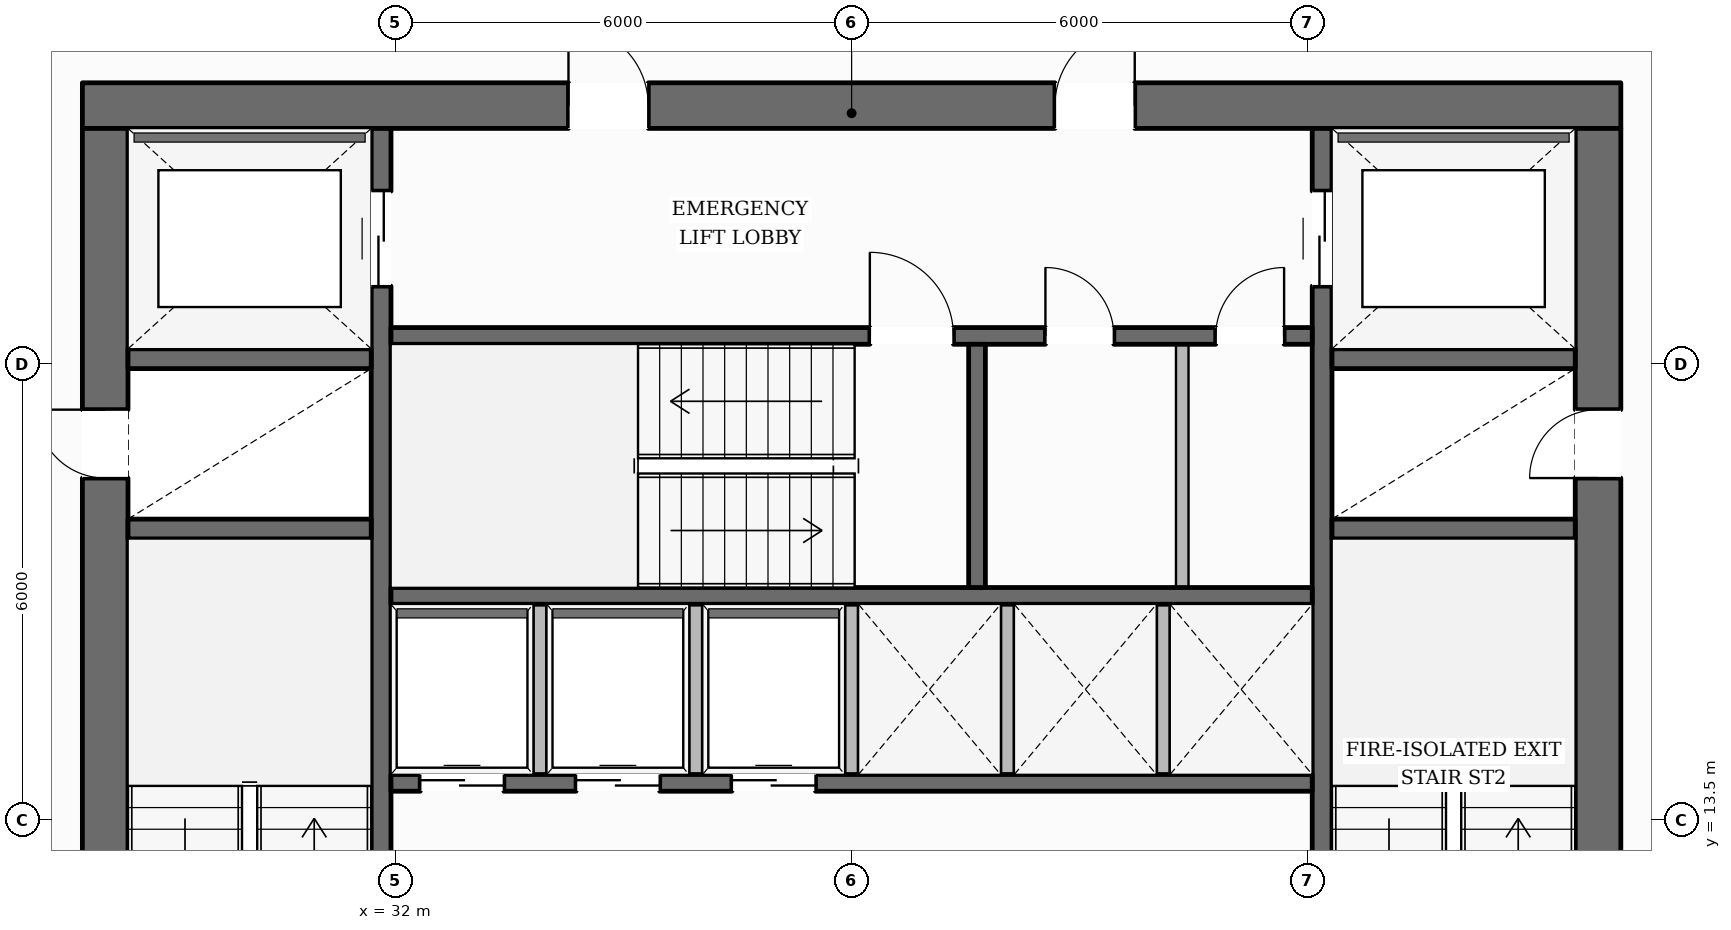
"""IFC4 building model, lengths in metres.
Left out: names, types, materials, properties, quantities, classifications, styles, units other than length and angle.
Written with IfcOpenShell. Run it as: python <this file> out.ifc"""

import sys

from ifc_helpers import new_model, si_unit, direction, frame, frame_2d, origin, place, context, subcontext, project, spatial, rectangle, extrude, element, fill, save


model = new_model("IFC4")
c1 = context("Model", 3, precision=1e-05, world=origin(), true_north=direction((0.0, 1.0)))
c2 = subcontext(c1, "Body", "Model", "MODEL_VIEW")
j1 = project(units=[si_unit("LENGTHUNIT", "METRE"), si_unit("PLANEANGLEUNIT", "RADIAN")], contexts=[c1])
p1 = place(None, origin())
s1 = spatial("IfcSite", under=j1, at=p1, CompositionType="ELEMENT")
p2 = place(p1, origin())
s2 = spatial("IfcBuilding", under=s1, at=p2, CompositionType="ELEMENT")
p3 = place(p2, frame((0.0, 0.0, 71.45)))
s3 = spatial("IfcBuildingStorey", under=s2, at=p3, CompositionType="ELEMENT", Elevation=71.45)
p4 = place(p3, frame((27.88, 22.9, 0.0), z_axis=(0.0, 0.0, 1.0), x_axis=(1.0, 0.0, 0.0)))
e1 = element("IfcWall", 1, at=p4, inside=s3, PredefinedType="SOLIDWALL", context=c2, shape_type="SweptSolid", body=[
    extrude(rectangle(XDim=20.24, YDim=0.6, at=frame_2d((10.12, 0.0))), origin(), (0.0, 0.0, 1.0), 3.43),
])
p5 = place(p4, frame((6.395, 0.0, 0.0)))
e2 = element("IfcOpeningElement", 2, at=p5, cuts=e1, PredefinedType="OPENING", context=c2, shape_type="SweptSolid", body=[
    extrude(rectangle(XDim=1.05, YDim=2.15, at=frame_2d((0.525, 1.075))), frame((0.0, 0.31, 0.0), z_axis=(0.0, -1.0, 0.0), x_axis=(1.0, 0.0, 0.0)), (0.0, 0.0, 1.0), 0.62),
])
p6 = place(p4, frame((12.795, 0.0, 0.0)))
e3 = element("IfcOpeningElement", 3, at=p6, cuts=e1, PredefinedType="OPENING", context=c2, shape_type="SweptSolid", body=[
    extrude(rectangle(XDim=1.05, YDim=2.15, at=frame_2d((0.525, 1.075))), frame((0.0, 0.31, 0.0), z_axis=(0.0, -1.0, 0.0), x_axis=(1.0, 0.0, 0.0)), (0.0, 0.0, 1.0), 0.62),
])
p7 = place(p3, frame((28.18, 9.6, 0.0), z_axis=(0.0, 0.0, 1.0), x_axis=(0.0, 1.0, 0.0)))
e4 = element("IfcWall", 4, at=p7, inside=s3, PredefinedType="SOLIDWALL", context=c2, shape_type="SweptSolid", body=[
    extrude(rectangle(XDim=13.0, YDim=0.6, at=frame_2d((6.5, 0.0))), origin(), (0.0, 0.0, 1.0), 3.43),
])
p8 = place(p7, frame((0.2, 0.0, 0.0)))
e5 = element("IfcOpeningElement", 5, at=p8, cuts=e4, PredefinedType="OPENING", context=c2, shape_type="SweptSolid", body=[
    extrude(rectangle(XDim=1.1, YDim=2.15, at=frame_2d((0.55, 1.075))), frame((0.0, 0.31, 0.0), z_axis=(0.0, -1.0, 0.0), x_axis=(1.0, 0.0, 0.0)), (0.0, 0.0, 1.0), 0.62),
])
p9 = place(p7, frame((8.4, 0.0, 0.0)))
e6 = element("IfcOpeningElement", 6, at=p9, cuts=e4, PredefinedType="OPENING", context=c2, shape_type="SweptSolid", body=[
    extrude(rectangle(XDim=0.9, YDim=2.1, at=frame_2d((0.45, 1.05))), frame((0.0, 0.31, 0.0), z_axis=(0.0, -1.0, 0.0), x_axis=(1.0, 0.0, 0.0)), (0.0, 0.0, 1.0), 0.62),
])
p10 = place(p3, frame((47.82, 9.6, 0.0), z_axis=(0.0, 0.0, 1.0), x_axis=(0.0, 1.0, 0.0)))
e7 = element("IfcWall", 7, at=p10, inside=s3, PredefinedType="SOLIDWALL", context=c2, shape_type="SweptSolid", body=[
    extrude(rectangle(XDim=13.0, YDim=0.6, at=frame_2d((6.5, 0.0))), origin(), (0.0, 0.0, 1.0), 3.43),
])
p11 = place(p10, frame((0.2, 0.0, 0.0)))
e8 = element("IfcOpeningElement", 8, at=p11, cuts=e7, PredefinedType="OPENING", context=c2, shape_type="SweptSolid", body=[
    extrude(rectangle(XDim=1.1, YDim=2.15, at=frame_2d((0.55, 1.075))), frame((0.0, 0.31, 0.0), z_axis=(0.0, -1.0, 0.0), x_axis=(1.0, 0.0, 0.0)), (0.0, 0.0, 1.0), 0.62),
])
p12 = place(p10, frame((8.4, 0.0, 0.0)))
e9 = element("IfcOpeningElement", 9, at=p12, cuts=e7, PredefinedType="OPENING", context=c2, shape_type="SweptSolid", body=[
    extrude(rectangle(XDim=0.9, YDim=2.1, at=frame_2d((0.45, 1.05))), frame((0.0, 0.31, 0.0), z_axis=(0.0, -1.0, 0.0), x_axis=(1.0, 0.0, 0.0)), (0.0, 0.0, 1.0), 0.62),
])
p13 = place(p3, frame((31.81, 9.6, 0.0), z_axis=(0.0, 0.0, 1.0), x_axis=(0.0, 1.0, 0.0)))
e10 = element("IfcWall", 10, at=p13, inside=s3, PredefinedType="SHEAR", context=c2, shape_type="SweptSolid", body=[
    extrude(rectangle(XDim=13.0, YDim=0.26, at=frame_2d((6.5, 0.0))), origin(), (0.0, 0.0, 1.0), 3.43),
])
p14 = place(p13, frame((10.925, 0.0, 0.0)))
e11 = element("IfcOpeningElement", 11, at=p14, cuts=e10, PredefinedType="OPENING", context=c2, shape_type="SweptSolid", body=[
    extrude(rectangle(XDim=1.25, YDim=2.25, at=frame_2d((0.625, 1.125))), frame((0.0, 0.14, 0.0), z_axis=(0.0, -1.0, 0.0), x_axis=(1.0, 0.0, 0.0)), (0.0, 0.0, 1.0), 0.28),
])
p15 = place(p3, frame((44.19, 9.6, 0.0), z_axis=(0.0, 0.0, 1.0), x_axis=(0.0, 1.0, 0.0)))
e12 = element("IfcWall", 12, at=p15, inside=s3, PredefinedType="SHEAR", context=c2, shape_type="SweptSolid", body=[
    extrude(rectangle(XDim=13.0, YDim=0.26, at=frame_2d((6.5, 0.0))), origin(), (0.0, 0.0, 1.0), 3.43),
])
p16 = place(p15, frame((10.925, 0.0, 0.0)))
e13 = element("IfcOpeningElement", 13, at=p16, cuts=e12, PredefinedType="OPENING", context=c2, shape_type="SweptSolid", body=[
    extrude(rectangle(XDim=1.25, YDim=2.25, at=frame_2d((0.625, 1.125))), frame((0.0, 0.14, 0.0), z_axis=(0.0, -1.0, 0.0), x_axis=(1.0, 0.0, 0.0)), (0.0, 0.0, 1.0), 0.28),
])
for number, where, z_axis, x_axis in (
    (14, (28.48, 17.33, 0.0), (0.0, 0.0, 1.0), (1.0, 0.0, 0.0)),
    (15, (28.48, 19.57, 0.0), (0.0, 0.0, 1.0), (1.0, 0.0, 0.0)),
    (16, (44.32, 17.33, 0.0), (0.0, 0.0, 1.0), (1.0, 0.0, 0.0)),
    (17, (44.32, 19.57, 0.0), (0.0, 0.0, 1.0), (1.0, 0.0, 0.0)),
):
    element("IfcWall", number, at=place(p3, frame(where, z_axis=z_axis, x_axis=x_axis)), inside=s3, PredefinedType="SHEAR", context=c2, shape_type="SweptSolid", body=[
        extrude(rectangle(XDim=3.2, YDim=0.26, at=frame_2d((1.6, 0.0))), origin(), (0.0, 0.0, 1.0), 3.43),
    ])
p17 = place(p3, frame((31.94, 19.87, 0.0), z_axis=(0.0, 0.0, 1.0), x_axis=(1.0, 0.0, 0.0)))
e18 = element("IfcWall", 18, at=p17, inside=s3, PredefinedType="SOLIDWALL", context=c2, shape_type="SweptSolid", body=[
    extrude(rectangle(XDim=12.12, YDim=0.22, at=frame_2d((6.06, 0.0))), origin(), (0.0, 0.0, 1.0), 3.43),
])
p18 = place(p17, frame((6.3, 0.0, 0.0)))
e19 = element("IfcOpeningElement", 19, at=p18, cuts=e18, PredefinedType="OPENING", context=c2, shape_type="SweptSolid", body=[
    extrude(rectangle(XDim=1.1, YDim=2.15, at=frame_2d((0.55, 1.075))), frame((0.0, 0.12, 0.0), z_axis=(0.0, -1.0, 0.0), x_axis=(1.0, 0.0, 0.0)), (0.0, 0.0, 1.0), 0.24),
])
p19 = place(p17, frame((8.61, 0.0, 0.0)))
e20 = element("IfcOpeningElement", 20, at=p19, cuts=e18, PredefinedType="OPENING", context=c2, shape_type="SweptSolid", body=[
    extrude(rectangle(XDim=0.9, YDim=2.1, at=frame_2d((0.45, 1.05))), frame((0.0, 0.12, 0.0), z_axis=(0.0, -1.0, 0.0), x_axis=(1.0, 0.0, 0.0)), (0.0, 0.0, 1.0), 0.24),
])
p20 = place(p17, frame((10.85, 0.0, 0.0)))
e21 = element("IfcOpeningElement", 21, at=p20, cuts=e18, PredefinedType="OPENING", context=c2, shape_type="SweptSolid", body=[
    extrude(rectangle(XDim=0.9, YDim=2.1, at=frame_2d((0.45, 1.05))), frame((0.0, 0.12, 0.0), z_axis=(0.0, -1.0, 0.0), x_axis=(1.0, 0.0, 0.0)), (0.0, 0.0, 1.0), 0.24),
])
p21 = place(p3, frame((31.94, 16.45, 0.0), z_axis=(0.0, 0.0, 1.0), x_axis=(1.0, 0.0, 0.0)))
e22 = element("IfcWall", 22, at=p21, inside=s3, PredefinedType="SOLIDWALL", context=c2, shape_type="SweptSolid", body=[
    extrude(rectangle(XDim=12.12, YDim=0.22, at=frame_2d((6.06, 0.0))), origin(), (0.0, 0.0, 1.0), 3.43),
])
p22 = place(p3, frame((39.65, 16.56, 0.0), z_axis=(0.0, 0.0, 1.0), x_axis=(0.0, 1.0, 0.0)))
e23 = element("IfcWall", 23, at=p22, inside=s3, PredefinedType="SOLIDWALL", context=c2, shape_type="SweptSolid", body=[
    extrude(rectangle(XDim=3.2, YDim=0.22, at=frame_2d((1.6, 0.0))), origin(), (0.0, 0.0, 1.0), 3.43),
])
p23 = place(p3, frame((31.94, 13.99, 0.0), z_axis=(0.0, 0.0, 1.0), x_axis=(1.0, 0.0, 0.0)))
e24 = element("IfcWall", 24, at=p23, inside=s3, PredefinedType="SOLIDWALL", context=c2, shape_type="SweptSolid", body=[
    extrude(rectangle(XDim=12.12, YDim=0.22, at=frame_2d((6.06, 0.0))), origin(), (0.0, 0.0, 1.0), 3.43),
])
p24 = place(p23, frame((0.385, 0.0, 0.0)))
e25 = element("IfcOpeningElement", 25, at=p24, cuts=e24, PredefinedType="OPENING", context=c2, shape_type="SweptSolid", body=[
    extrude(rectangle(XDim=1.1, YDim=2.2, at=frame_2d((0.55, 1.1))), frame((0.0, 0.12, 0.0), z_axis=(0.0, -1.0, 0.0), x_axis=(1.0, 0.0, 0.0)), (0.0, 0.0, 1.0), 0.24),
])
p25 = place(p23, frame((2.435, 0.0, 0.0)))
e26 = element("IfcOpeningElement", 26, at=p25, cuts=e24, PredefinedType="OPENING", context=c2, shape_type="SweptSolid", body=[
    extrude(rectangle(XDim=1.1, YDim=2.2, at=frame_2d((0.55, 1.1))), frame((0.0, 0.12, 0.0), z_axis=(0.0, -1.0, 0.0), x_axis=(1.0, 0.0, 0.0)), (0.0, 0.0, 1.0), 0.24),
])
p26 = place(p23, frame((4.485, 0.0, 0.0)))
e27 = element("IfcOpeningElement", 27, at=p26, cuts=e24, PredefinedType="OPENING", context=c2, shape_type="SweptSolid", body=[
    extrude(rectangle(XDim=1.1, YDim=2.2, at=frame_2d((0.55, 1.1))), frame((0.0, 0.12, 0.0), z_axis=(0.0, -1.0, 0.0), x_axis=(1.0, 0.0, 0.0)), (0.0, 0.0, 1.0), 0.24),
])
p27 = place(p3, frame((12.473, 13.275, 0.0), z_axis=(0.0, 0.0, 1.0), x_axis=(0.504426765764, 0.863454479391, 0.0)))
e28 = element("IfcWall", 28, at=p27, inside=s3, PredefinedType="STANDARD", context=c2, shape_type="SweptSolid", body=[
    extrude(rectangle(XDim=36.594, YDim=0.38, at=frame_2d((18.297, 0.0))), origin(), (0.0, 0.0, 1.0), 2.81),
])
p28 = place(p27, frame((8.749, 0.0, 0.0)))
e29 = element("IfcOpeningElement", 29, at=p28, cuts=e28, PredefinedType="OPENING", context=c2, shape_type="SweptSolid", body=[
    extrude(rectangle(XDim=1.0, YDim=2.2, at=frame_2d((0.5, 1.1))), frame((0.0, 0.2, 0.0), z_axis=(0.0, -1.0, 0.0), x_axis=(1.0, 0.0, 0.0)), (0.0, 0.0, 1.0), 0.4),
])
p29 = place(p27, frame((32.326, 0.0, 0.55)))
e30 = element("IfcOpeningElement", 30, at=p29, cuts=e28, PredefinedType="OPENING", context=c2, shape_type="SweptSolid", body=[
    extrude(rectangle(XDim=1.65, YDim=1.6, at=frame_2d((0.825, 0.8))), frame((0.0, 0.2, 0.0), z_axis=(0.0, -1.0, 0.0), x_axis=(1.0, 0.0, 0.0)), (0.0, 0.0, 1.0), 0.4),
])
p30 = place(p27, frame((26.385, 0.0, 0.55)))
e31 = element("IfcOpeningElement", 31, at=p30, cuts=e28, PredefinedType="OPENING", context=c2, shape_type="SweptSolid", body=[
    extrude(rectangle(XDim=1.65, YDim=1.6, at=frame_2d((0.825, 0.8))), frame((0.0, 0.2, 0.0), z_axis=(0.0, -1.0, 0.0), x_axis=(1.0, 0.0, 0.0)), (0.0, 0.0, 1.0), 0.4),
])
p31 = place(p27, frame((20.445, 0.0, 0.55)))
e32 = element("IfcOpeningElement", 32, at=p31, cuts=e28, PredefinedType="OPENING", context=c2, shape_type="SweptSolid", body=[
    extrude(rectangle(XDim=1.65, YDim=1.6, at=frame_2d((0.825, 0.8))), frame((0.0, 0.2, 0.0), z_axis=(0.0, -1.0, 0.0), x_axis=(1.0, 0.0, 0.0)), (0.0, 0.0, 1.0), 0.4),
])
p32 = place(p27, frame((2.624, 0.0, 0.55)))
e33 = element("IfcOpeningElement", 33, at=p32, cuts=e28, PredefinedType="OPENING", context=c2, shape_type="SweptSolid", body=[
    extrude(rectangle(XDim=1.65, YDim=1.6, at=frame_2d((0.825, 0.8))), frame((0.0, 0.2, 0.0), z_axis=(0.0, -1.0, 0.0), x_axis=(1.0, 0.0, 0.0)), (0.0, 0.0, 1.0), 0.4),
])
p33 = place(p3, frame((44.918, 44.961, 0.0), z_axis=(0.0, 0.0, 1.0), x_axis=(0.499266462474, -0.866448497863, 0.0)))
e34 = element("IfcWall", 34, at=p33, inside=s3, PredefinedType="STANDARD", context=c2, shape_type="SweptSolid", body=[
    extrude(rectangle(XDim=36.221, YDim=0.38, at=frame_2d((18.11, 0.0))), origin(), (0.0, 0.0, 1.0), 2.81),
])
p34 = place(p33, frame((31.979, 0.0, 0.55)))
e35 = element("IfcOpeningElement", 35, at=p34, cuts=e34, PredefinedType="OPENING", context=c2, shape_type="SweptSolid", body=[
    extrude(rectangle(XDim=1.65, YDim=1.6, at=frame_2d((0.825, 0.8))), frame((0.0, 0.2, 0.0), z_axis=(0.0, -1.0, 0.0), x_axis=(1.0, 0.0, 0.0)), (0.0, 0.0, 1.0), 0.4),
])
p35 = place(p33, frame((26.102, 0.0, 0.55)))
e36 = element("IfcOpeningElement", 36, at=p35, cuts=e34, PredefinedType="OPENING", context=c2, shape_type="SweptSolid", body=[
    extrude(rectangle(XDim=1.65, YDim=1.6, at=frame_2d((0.825, 0.8))), frame((0.0, 0.2, 0.0), z_axis=(0.0, -1.0, 0.0), x_axis=(1.0, 0.0, 0.0)), (0.0, 0.0, 1.0), 0.4),
])
p36 = place(p33, frame((20.224, 0.0, 0.55)))
e37 = element("IfcOpeningElement", 37, at=p36, cuts=e34, PredefinedType="OPENING", context=c2, shape_type="SweptSolid", body=[
    extrude(rectangle(XDim=1.65, YDim=1.6, at=frame_2d((0.825, 0.8))), frame((0.0, 0.2, 0.0), z_axis=(0.0, -1.0, 0.0), x_axis=(1.0, 0.0, 0.0)), (0.0, 0.0, 1.0), 0.4),
])
p37 = place(p33, frame((8.47, 0.0, 0.55)))
e38 = element("IfcOpeningElement", 38, at=p37, cuts=e34, PredefinedType="OPENING", context=c2, shape_type="SweptSolid", body=[
    extrude(rectangle(XDim=1.65, YDim=1.6, at=frame_2d((0.825, 0.8))), frame((0.0, 0.2, 0.0), z_axis=(0.0, -1.0, 0.0), x_axis=(1.0, 0.0, 0.0)), (0.0, 0.0, 1.0), 0.4),
])
p38 = place(p33, frame((2.593, 0.0, 0.55)))
e39 = element("IfcOpeningElement", 39, at=p38, cuts=e34, PredefinedType="OPENING", context=c2, shape_type="SweptSolid", body=[
    extrude(rectangle(XDim=1.65, YDim=1.6, at=frame_2d((0.825, 0.8))), frame((0.0, 0.2, 0.0), z_axis=(0.0, -1.0, 0.0), x_axis=(1.0, 0.0, 0.0)), (0.0, 0.0, 1.0), 0.4),
])
for number, where, z_axis, x_axis in (
    (40, (33.9, 14.1, 0.0), (0.0, 0.0, 1.0), (0.0, 1.0, 0.0)),
    (41, (35.95, 14.1, 0.0), (0.0, 0.0, 1.0), (0.0, 1.0, 0.0)),
    (42, (38.0, 14.1, 0.0), (0.0, 0.0, 1.0), (0.0, 1.0, 0.0)),
    (43, (40.05, 14.1, 0.0), (0.0, 0.0, 1.0), (0.0, 1.0, 0.0)),
    (44, (42.1, 14.1, 0.0), (0.0, 0.0, 1.0), (0.0, 1.0, 0.0)),
):
    element("IfcWall", number, at=place(p3, frame(where, z_axis=z_axis, x_axis=x_axis)), inside=s3, PredefinedType="PARTITIONING", context=c2, shape_type="SweptSolid", body=[
        extrude(rectangle(XDim=2.24, YDim=0.165, at=frame_2d((1.12, 0.0))), origin(), (0.0, 0.0, 1.0), 3.43),
    ])
p39 = place(p3, frame((42.35, 16.56, 0.0), z_axis=(0.0, 0.0, 1.0), x_axis=(0.0, 1.0, 0.0)))
e45 = element("IfcWall", 45, at=p39, inside=s3, PredefinedType="PARTITIONING", context=c2, shape_type="SweptSolid", body=[
    extrude(rectangle(XDim=3.2, YDim=0.165, at=frame_2d((1.6, 0.0))), origin(), (0.0, 0.0, 1.0), 3.43),
])
p40 = place(p18, origin())
e46 = element("IfcDoor", 46, at=p40, inside=s3, OperationType="SINGLE_SWING_LEFT", PredefinedType="DOOR", context=c2, shape_type="SweptSolid", body=[
    extrude(rectangle(XDim=1.1, YDim=2.15, at=frame_2d((0.55, 1.075))), frame((0.0, 0.025, 0.0), z_axis=(0.0, -1.0, 0.0), x_axis=(1.0, 0.0, 0.0)), (0.0, 0.0, 1.0), 0.05),
])
fill(e19, e46)
p41 = place(p9, origin())
e47 = element("IfcDoor", 47, at=p41, inside=s3, OperationType="SINGLE_SWING_RIGHT", PredefinedType="DOOR", context=c2, shape_type="SweptSolid", body=[
    extrude(rectangle(XDim=0.9, YDim=2.1, at=frame_2d((0.45, 1.05))), frame((0.0, 0.025, 0.0), z_axis=(0.0, -1.0, 0.0), x_axis=(1.0, 0.0, 0.0)), (0.0, 0.0, 1.0), 0.05),
])
fill(e6, e47)
p42 = place(p12, origin())
e48 = element("IfcDoor", 48, at=p42, inside=s3, OperationType="SINGLE_SWING_LEFT", PredefinedType="DOOR", context=c2, shape_type="SweptSolid", body=[
    extrude(rectangle(XDim=0.9, YDim=2.1, at=frame_2d((0.45, 1.05))), frame((0.0, 0.025, 0.0), z_axis=(0.0, -1.0, 0.0), x_axis=(1.0, 0.0, 0.0)), (0.0, 0.0, 1.0), 0.05),
])
fill(e9, e48)
p43 = place(p5, origin())
e49 = element("IfcDoor", 49, at=p43, inside=s3, OperationType="SINGLE_SWING_LEFT", PredefinedType="DOOR", context=c2, shape_type="SweptSolid", body=[
    extrude(rectangle(XDim=1.05, YDim=2.15, at=frame_2d((0.525, 1.075))), frame((0.0, 0.025, 0.0), z_axis=(0.0, -1.0, 0.0), x_axis=(1.0, 0.0, 0.0)), (0.0, 0.0, 1.0), 0.05),
])
fill(e2, e49)
p44 = place(p6, origin())
e50 = element("IfcDoor", 50, at=p44, inside=s3, OperationType="SINGLE_SWING_RIGHT", PredefinedType="DOOR", context=c2, shape_type="SweptSolid", body=[
    extrude(rectangle(XDim=1.05, YDim=2.15, at=frame_2d((0.525, 1.075))), frame((0.0, 0.025, 0.0), z_axis=(0.0, -1.0, 0.0), x_axis=(1.0, 0.0, 0.0)), (0.0, 0.0, 1.0), 0.05),
])
fill(e3, e50)
p45 = place(p14, origin())
e51 = element("IfcDoor", 51, at=p45, inside=s3, OperationType="DOUBLE_DOOR_SLIDING", PredefinedType="DOOR", context=c2, shape_type="SweptSolid", body=[
    extrude(rectangle(XDim=1.25, YDim=2.25, at=frame_2d((0.625, 1.125))), frame((0.0, 0.025, 0.0), z_axis=(0.0, -1.0, 0.0), x_axis=(1.0, 0.0, 0.0)), (0.0, 0.0, 1.0), 0.05),
])
fill(e11, e51)
p46 = place(p16, origin())
e52 = element("IfcDoor", 52, at=p46, inside=s3, OperationType="DOUBLE_DOOR_SLIDING", PredefinedType="DOOR", context=c2, shape_type="SweptSolid", body=[
    extrude(rectangle(XDim=1.25, YDim=2.25, at=frame_2d((0.625, 1.125))), frame((0.0, 0.025, 0.0), z_axis=(0.0, -1.0, 0.0), x_axis=(1.0, 0.0, 0.0)), (0.0, 0.0, 1.0), 0.05),
])
fill(e13, e52)
p47 = place(p24, origin())
e53 = element("IfcDoor", 53, at=p47, inside=s3, OperationType="DOUBLE_DOOR_SLIDING", PredefinedType="DOOR", context=c2, shape_type="SweptSolid", body=[
    extrude(rectangle(XDim=1.1, YDim=2.2, at=frame_2d((0.55, 1.1))), frame((0.0, 0.025, 0.0), z_axis=(0.0, -1.0, 0.0), x_axis=(1.0, 0.0, 0.0)), (0.0, 0.0, 1.0), 0.05),
])
fill(e25, e53)
p48 = place(p25, origin())
e54 = element("IfcDoor", 54, at=p48, inside=s3, OperationType="DOUBLE_DOOR_SLIDING", PredefinedType="DOOR", context=c2, shape_type="SweptSolid", body=[
    extrude(rectangle(XDim=1.1, YDim=2.2, at=frame_2d((0.55, 1.1))), frame((0.0, 0.025, 0.0), z_axis=(0.0, -1.0, 0.0), x_axis=(1.0, 0.0, 0.0)), (0.0, 0.0, 1.0), 0.05),
])
fill(e26, e54)
p49 = place(p26, origin())
e55 = element("IfcDoor", 55, at=p49, inside=s3, OperationType="DOUBLE_DOOR_SLIDING", PredefinedType="DOOR", context=c2, shape_type="SweptSolid", body=[
    extrude(rectangle(XDim=1.1, YDim=2.2, at=frame_2d((0.55, 1.1))), frame((0.0, 0.025, 0.0), z_axis=(0.0, -1.0, 0.0), x_axis=(1.0, 0.0, 0.0)), (0.0, 0.0, 1.0), 0.05),
])
fill(e27, e55)
p50 = place(p19, origin())
e56 = element("IfcDoor", 56, at=p50, inside=s3, OperationType="SINGLE_SWING_LEFT", PredefinedType="DOOR", context=c2, shape_type="SweptSolid", body=[
    extrude(rectangle(XDim=0.9, YDim=2.1, at=frame_2d((0.45, 1.05))), frame((0.0, 0.025, 0.0), z_axis=(0.0, -1.0, 0.0), x_axis=(1.0, 0.0, 0.0)), (0.0, 0.0, 1.0), 0.05),
])
fill(e20, e56)
p51 = place(p20, origin())
e57 = element("IfcDoor", 57, at=p51, inside=s3, OperationType="SINGLE_SWING_RIGHT", PredefinedType="DOOR", context=c2, shape_type="SweptSolid", body=[
    extrude(rectangle(XDim=0.9, YDim=2.1, at=frame_2d((0.45, 1.05))), frame((0.0, 0.025, 0.0), z_axis=(0.0, -1.0, 0.0), x_axis=(1.0, 0.0, 0.0)), (0.0, 0.0, 1.0), 0.05),
])
fill(e21, e57)
save(model, sys.argv[1])
